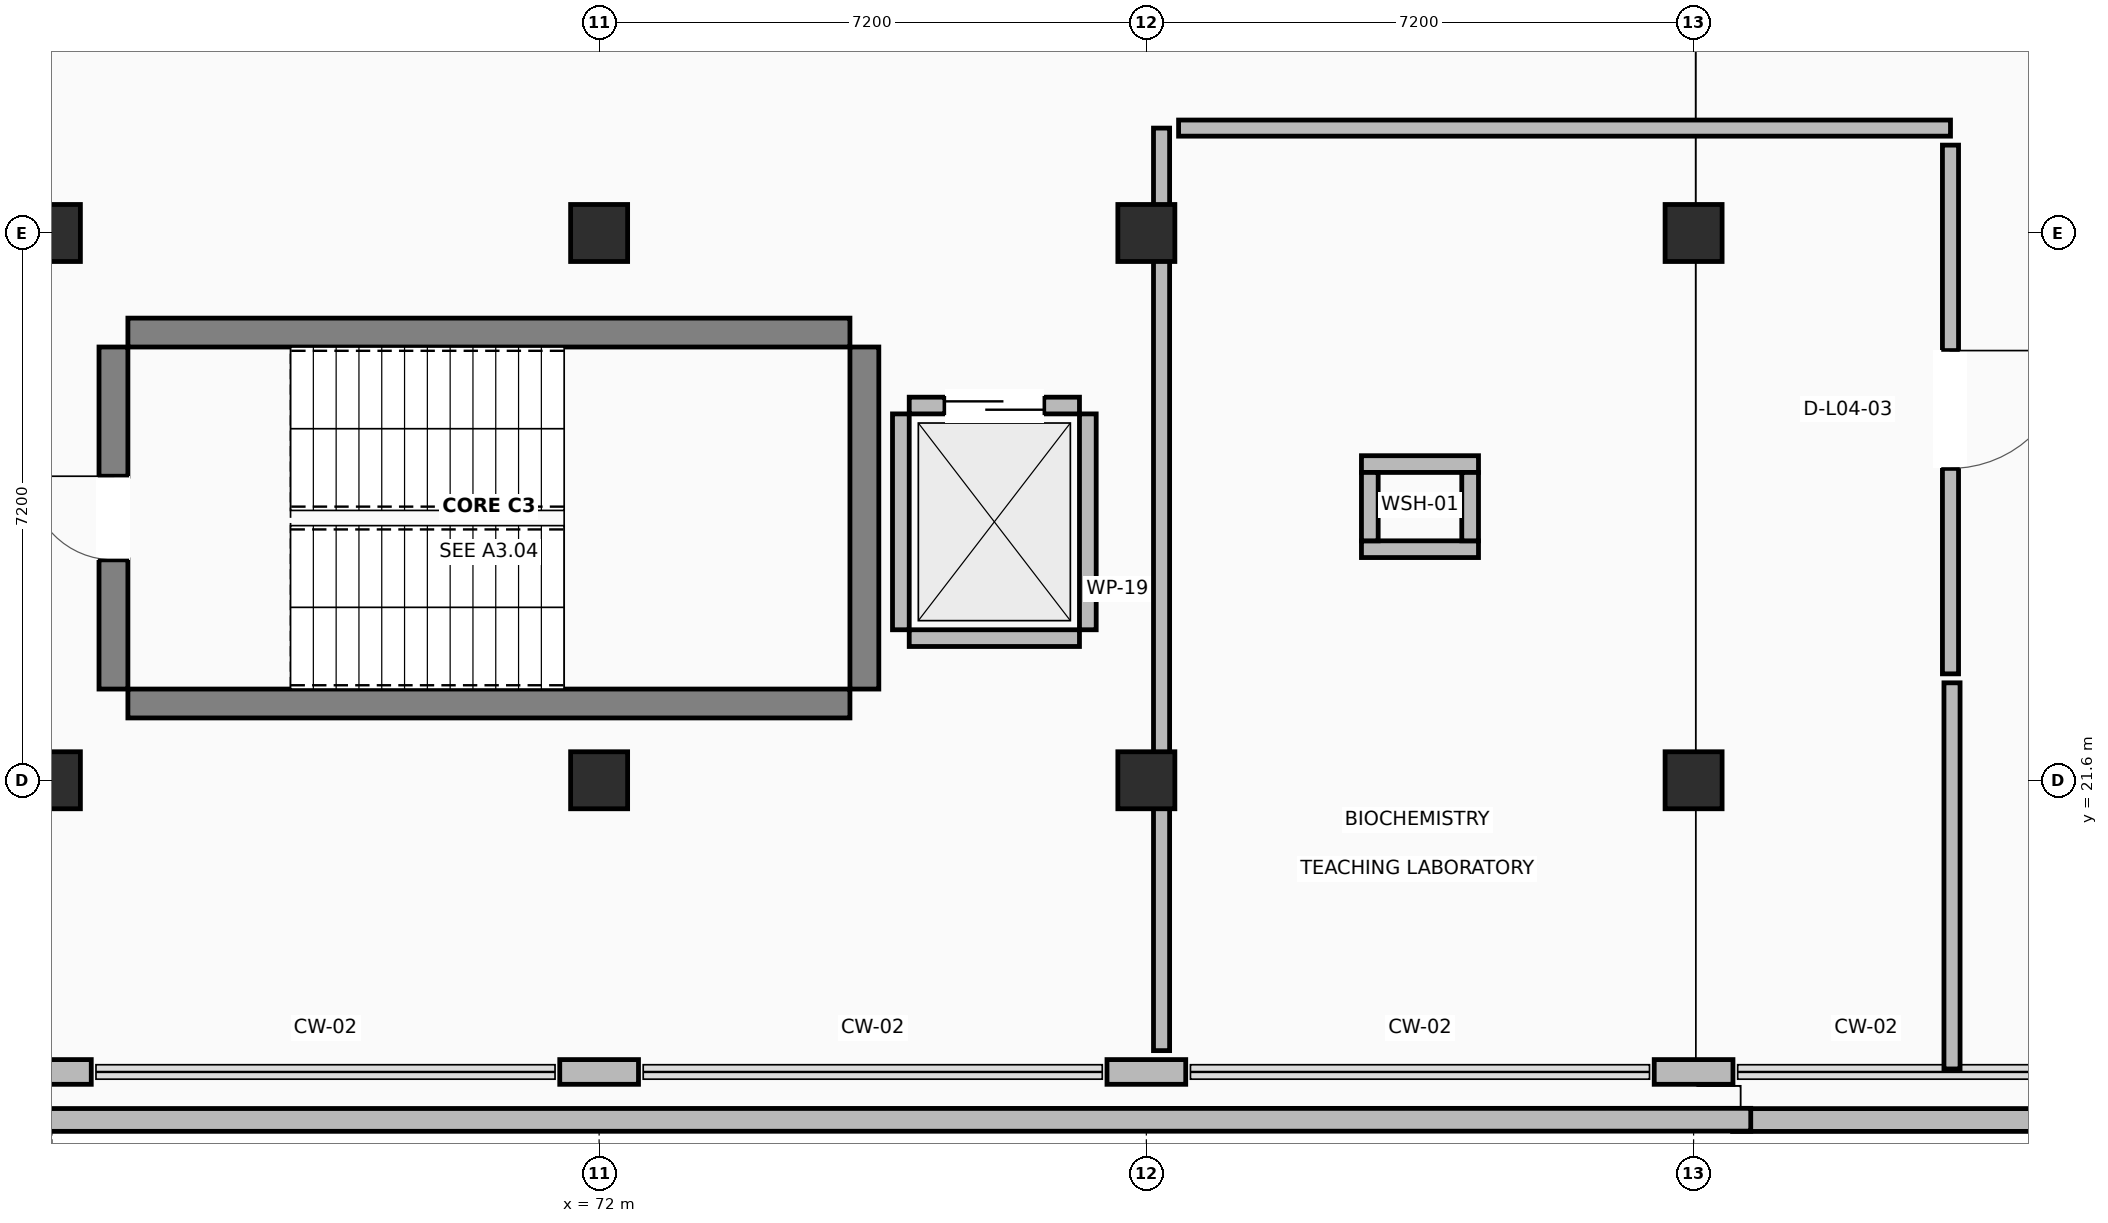
"""IFC4 building model, lengths in metres.
Left out: names, types, materials, properties, quantities, classifications, styles, units other than length and angle.
Written with IfcOpenShell. Run it as: python <this file> out.ifc"""

import sys

from ifc_helpers import new_model, si_unit, direction, frame, frame_2d, origin, origin_2d, place, context, subcontext, project, spatial, rectangle, extrude, element, fill, save


model = new_model("IFC4")
c1 = context("Model", 3, precision=1e-05, world=origin(), true_north=direction((0.0, 1.0)))
c2 = subcontext(c1, "Body", "Model", "MODEL_VIEW")
j1 = project(units=[si_unit("LENGTHUNIT", "METRE"), si_unit("PLANEANGLEUNIT", "RADIAN")], contexts=[c1])
p1 = place(None, origin())
s1 = spatial("IfcSite", under=j1, at=p1, CompositionType="ELEMENT")
p2 = place(p1, origin())
s2 = spatial("IfcBuilding", under=s1, at=p2, CompositionType="ELEMENT")
p3 = place(p2, frame((0.0, 0.0, 18.0)))
s3 = spatial("IfcBuildingStorey", under=s2, at=p3, CompositionType="ELEMENT", Elevation=18.0)
for number, where, z_axis, x_axis in (
    (1, (64.8, 21.6, 0.0), (0.0, 0.0, 1.0), (1.0, 0.0, 0.0)),
    (2, (64.8, 28.8, 0.0), (0.0, 0.0, 1.0), (1.0, 0.0, 0.0)),
    (3, (72.0, 21.6, 0.0), (0.0, 0.0, 1.0), (1.0, 0.0, 0.0)),
    (4, (72.0, 28.8, 0.0), (0.0, 0.0, 1.0), (1.0, 0.0, 0.0)),
    (5, (79.2, 21.6, 0.0), (0.0, 0.0, 1.0), (1.0, 0.0, 0.0)),
    (6, (79.2, 28.8, 0.0), (0.0, 0.0, 1.0), (1.0, 0.0, 0.0)),
    (7, (86.4, 21.6, 0.0), (0.0, 0.0, 1.0), (1.0, 0.0, 0.0)),
    (8, (86.4, 28.8, 0.0), (0.0, 0.0, 1.0), (1.0, 0.0, 0.0)),
):
    element("IfcColumn", number, at=place(p3, frame(where, z_axis=z_axis, x_axis=x_axis)), inside=s3, PredefinedType="COLUMN", context=c2, shape_type="SweptSolid", body=[
        extrude(rectangle(XDim=0.75, YDim=0.75, at=origin_2d()), origin(), (0.0, 0.0, 1.0), 4.22),
    ])
for number, where, z_axis, x_axis in (
    (9, (65.8, 22.61, 0.0), (0.0, 0.0, 1.0), (1.0, 0.0, 0.0)),
    (10, (65.8, 27.49, 0.0), (0.0, 0.0, 1.0), (1.0, 0.0, 0.0)),
):
    element("IfcWall", number, at=place(p3, frame(where, z_axis=z_axis, x_axis=x_axis)), inside=s3, PredefinedType="SHEAR", context=c2, shape_type="SweptSolid", body=[
        extrude(rectangle(XDim=9.5, YDim=0.38, at=frame_2d((4.75, 0.0))), origin(), (0.0, 0.0, 1.0), 4.22),
    ])
p4 = place(p3, frame((65.61, 22.8, 0.0), z_axis=(0.0, 0.0, 1.0), x_axis=(0.0, 1.0, 0.0)))
e11 = element("IfcWall", 11, at=p4, inside=s3, PredefinedType="SHEAR", context=c2, shape_type="SweptSolid", body=[
    extrude(rectangle(XDim=4.5, YDim=0.38, at=frame_2d((2.25, 0.0))), origin(), (0.0, 0.0, 1.0), 4.22),
])
p5 = place(p4, frame((1.7, 0.0, 0.0)))
e12 = element("IfcOpeningElement", 12, at=p5, cuts=e11, PredefinedType="OPENING", context=c2, shape_type="SweptSolid", body=[
    extrude(rectangle(XDim=1.1, YDim=2.15, at=frame_2d((0.55, 1.075))), frame((0.0, 0.2, 0.0), z_axis=(0.0, -1.0, 0.0), x_axis=(1.0, 0.0, 0.0)), (0.0, 0.0, 1.0), 0.4),
])
p6 = place(p3, frame((75.49, 22.8, 0.0), z_axis=(0.0, 0.0, 1.0), x_axis=(0.0, 1.0, 0.0)))
e13 = element("IfcWall", 13, at=p6, inside=s3, PredefinedType="SHEAR", context=c2, shape_type="SweptSolid", body=[
    extrude(rectangle(XDim=4.5, YDim=0.38, at=frame_2d((2.25, 0.0))), origin(), (0.0, 0.0, 1.0), 4.22),
])
for number, where, z_axis, x_axis in (
    (14, (64.282, 17.762, 0.0), (0.0, 0.0, 1.0), (1.0, 0.0, 0.0)),
    (15, (71.482, 17.762, 0.0), (0.0, 0.0, 1.0), (1.0, 0.0, 0.0)),
    (16, (78.682, 17.762, 0.0), (0.0, 0.0, 1.0), (1.0, 0.0, 0.0)),
):
    element("IfcWall", number, at=place(p3, frame(where, z_axis=z_axis, x_axis=x_axis)), inside=s3, PredefinedType="STANDARD", context=c2, shape_type="SweptSolid", body=[
        extrude(rectangle(XDim=1.036, YDim=0.325, at=frame_2d((0.518, 0.0))), origin(), (0.0, 0.0, 1.0), 3.26),
    ])
p7 = place(p3, frame((85.882, 17.762, 0.0), z_axis=(0.0, 0.0, 1.0), x_axis=(1.0, 0.0, 0.0)))
e17 = element("IfcWall", 17, at=p7, inside=s3, PredefinedType="STANDARD", context=c2, shape_type="SweptSolid", body=[
    extrude(rectangle(XDim=1.036, YDim=0.325, at=frame_2d((0.518, 0.0))), origin(), (0.0, 0.0, 1.0), 3.26),
])
p8 = place(p3, frame((115.82, 17.134, 0.0), z_axis=(0.0, 0.0, 1.0), x_axis=(-0.999999989693, -0.000143577442, 0.0)))
e18 = element("IfcWall", 18, at=p8, inside=s3, PredefinedType="PARAPET", context=c2, shape_type="SweptSolid", body=[
    extrude(rectangle(XDim=28.907, YDim=0.3, at=frame_2d((14.454, 0.0))), origin(), (0.0, 0.0, 1.0), 1.18),
])
p9 = place(p3, frame((87.152, 17.134, 0.0), z_axis=(0.0, 0.0, 1.0), x_axis=(-0.999999990118, -0.00014058533, 0.0)))
e19 = element("IfcWall", 19, at=p9, inside=s3, PredefinedType="PARAPET", context=c2, shape_type="SweptSolid", body=[
    extrude(rectangle(XDim=29.522, YDim=0.3, at=frame_2d((14.761, 0.0))), origin(), (0.0, 0.0, 1.0), 1.18),
])
p10 = place(p3, frame((76.08, 23.47, 0.0), z_axis=(0.0, 0.0, 1.0), x_axis=(1.0, 0.0, 0.0)))
e20 = element("IfcWall", 20, at=p10, inside=s3, PredefinedType="STANDARD", context=c2, shape_type="SweptSolid", body=[
    extrude(rectangle(XDim=2.24, YDim=0.22, at=frame_2d((1.12, 0.0))), origin(), (0.0, 0.0, 1.0), 3.26),
])
p11 = place(p3, frame((76.08, 26.53, 0.0), z_axis=(0.0, 0.0, 1.0), x_axis=(1.0, 0.0, 0.0)))
e21 = element("IfcWall", 21, at=p11, inside=s3, PredefinedType="STANDARD", context=c2, shape_type="SweptSolid", body=[
    extrude(rectangle(XDim=2.24, YDim=0.22, at=frame_2d((1.12, 0.0))), origin(), (0.0, 0.0, 1.0), 3.26),
])
p12 = place(p11, frame((0.47, 0.0, 0.0)))
e22 = element("IfcOpeningElement", 22, at=p12, cuts=e21, PredefinedType="OPENING", context=c2, shape_type="SweptSolid", body=[
    extrude(rectangle(XDim=1.3, YDim=2.2, at=frame_2d((0.65, 1.1))), frame((0.0, 0.12, 0.0), z_axis=(0.0, -1.0, 0.0), x_axis=(1.0, 0.0, 0.0)), (0.0, 0.0, 1.0), 0.24),
])
for number, where, z_axis, x_axis in (
    (23, (75.97, 23.58, 0.0), (0.0, 0.0, 1.0), (0.0, 1.0, 0.0)),
    (24, (78.43, 23.58, 0.0), (0.0, 0.0, 1.0), (0.0, 1.0, 0.0)),
):
    element("IfcWall", number, at=place(p3, frame(where, z_axis=z_axis, x_axis=x_axis)), inside=s3, PredefinedType="STANDARD", context=c2, shape_type="SweptSolid", body=[
        extrude(rectangle(XDim=2.84, YDim=0.22, at=frame_2d((1.42, 0.0))), origin(), (0.0, 0.0, 1.0), 3.26),
    ])
for number, where, z_axis, x_axis in (
    (25, (82.03, 24.64, 0.0), (0.0, 0.0, 1.0), (1.0, 0.0, 0.0)),
    (26, (82.03, 25.76, 0.0), (0.0, 0.0, 1.0), (1.0, 0.0, 0.0)),
):
    element("IfcWall", number, at=place(p3, frame(where, z_axis=z_axis, x_axis=x_axis)), inside=s3, PredefinedType="STANDARD", context=c2, shape_type="SweptSolid", body=[
        extrude(rectangle(XDim=1.54, YDim=0.22, at=frame_2d((0.77, 0.0))), origin(), (0.0, 0.0, 1.0), 3.26),
    ])
for number, where, z_axis, x_axis in (
    (27, (82.14, 24.75, 0.0), (0.0, 0.0, 1.0), (0.0, 1.0, 0.0)),
    (28, (83.46, 24.75, 0.0), (0.0, 0.0, 1.0), (0.0, 1.0, 0.0)),
):
    element("IfcWall", number, at=place(p3, frame(where, z_axis=z_axis, x_axis=x_axis)), inside=s3, PredefinedType="STANDARD", context=c2, shape_type="SweptSolid", body=[
        extrude(rectangle(XDim=0.9, YDim=0.22, at=frame_2d((0.45, 0.0))), origin(), (0.0, 0.0, 1.0), 3.26),
    ])
p13 = place(p3, frame((79.4, 18.043, 0.0), z_axis=(0.0, 0.0, 1.0), x_axis=(0.0, 1.0, 0.0)))
e29 = element("IfcWall", 29, at=p13, inside=s3, PredefinedType="PARTITIONING", context=c2, shape_type="SweptSolid", body=[
    extrude(rectangle(XDim=12.137, YDim=0.212, at=frame_2d((6.068, 0.0))), origin(), (0.0, 0.0, 1.0), 3.26),
])
p14 = place(p3, frame((79.624, 30.18, 0.0), z_axis=(0.0, 0.0, 1.0), x_axis=(1.0, 0.0, 0.0)))
e30 = element("IfcWall", 30, at=p14, inside=s3, PredefinedType="PARTITIONING", context=c2, shape_type="SweptSolid", body=[
    extrude(rectangle(XDim=10.156, YDim=0.212, at=frame_2d((5.078, 0.0))), origin(), (0.0, 0.0, 1.0), 3.26),
])
p15 = place(p3, frame((89.78, 29.956, 0.0), z_axis=(0.0, 0.0, 1.0), x_axis=(0.0, -1.0, 0.0)))
e31 = element("IfcWall", 31, at=p15, inside=s3, PredefinedType="PARTITIONING", context=c2, shape_type="SweptSolid", body=[
    extrude(rectangle(XDim=6.956, YDim=0.212, at=frame_2d((3.478, 0.0))), origin(), (0.0, 0.0, 1.0), 3.26),
])
p16 = place(p15, frame((2.703, 0.0, 0.0)))
e32 = element("IfcOpeningElement", 32, at=p16, cuts=e31, PredefinedType="OPENING", context=c2, shape_type="SweptSolid", body=[
    extrude(rectangle(XDim=1.55, YDim=2.2, at=frame_2d((0.775, 1.1))), frame((0.0, 0.116, 0.0), z_axis=(0.0, -1.0, 0.0), x_axis=(1.0, 0.0, 0.0)), (0.0, 0.0, 1.0), 0.232),
])
p17 = place(p3, frame((89.8, 22.882, 0.0), z_axis=(0.0, 0.0, 1.0), x_axis=(0.0, -1.0, 0.0)))
e33 = element("IfcWall", 33, at=p17, inside=s3, PredefinedType="PARTITIONING", context=c2, shape_type="SweptSolid", body=[
    extrude(rectangle(XDim=5.08, YDim=0.212, at=frame_2d((2.54, 0.0))), origin(), (0.0, 0.0, 1.0), 3.26),
])
p18 = place(p5, origin())
e34 = element("IfcDoor", 34, at=p18, inside=s3, OperationType="SINGLE_SWING_RIGHT", PredefinedType="DOOR", context=c2, shape_type="SweptSolid", body=[
    extrude(rectangle(XDim=1.1, YDim=2.15, at=frame_2d((0.55, 1.075))), frame((0.0, 0.025, 0.0), z_axis=(0.0, -1.0, 0.0), x_axis=(1.0, 0.0, 0.0)), (0.0, 0.0, 1.0), 0.05),
])
fill(e12, e34)
p19 = place(p12, origin())
e35 = element("IfcDoor", 35, at=p19, inside=s3, OperationType="SLIDING_TO_RIGHT", PredefinedType="DOOR", context=c2, shape_type="SweptSolid", body=[
    extrude(rectangle(XDim=1.3, YDim=2.2, at=frame_2d((0.65, 1.1))), frame((0.0, 0.025, 0.0), z_axis=(0.0, -1.0, 0.0), x_axis=(1.0, 0.0, 0.0)), (0.0, 0.0, 1.0), 0.05),
])
fill(e22, e35)
p20 = place(p16, origin())
e36 = element("IfcDoor", 36, at=p20, inside=s3, OperationType="SINGLE_SWING_LEFT", PredefinedType="DOOR", context=c2, shape_type="SweptSolid", body=[
    extrude(rectangle(XDim=1.55, YDim=2.2, at=frame_2d((0.775, 1.1))), frame((0.0, 0.025, 0.0), z_axis=(0.0, -1.0, 0.0), x_axis=(1.0, 0.0, 0.0)), (0.0, 0.0, 1.0), 0.05),
])
fill(e32, e36)
save(model, sys.argv[1])
